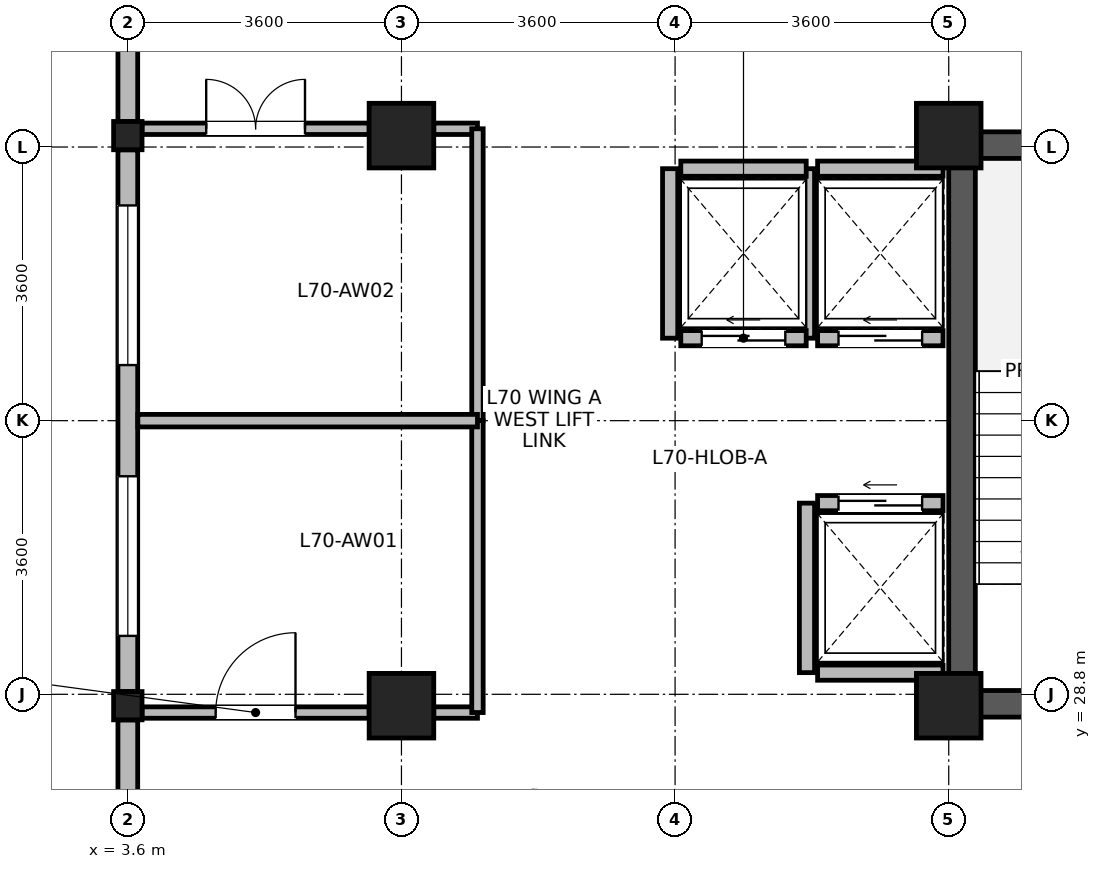
"""IFC4 building model, lengths in metres.
Left out: names, types, materials, properties, quantities, classifications, styles, units other than length and angle.
Written with IfcOpenShell. Run it as: python <this file> out.ifc"""

import sys

from ifc_helpers import new_model, si_unit, direction, frame, frame_2d, origin, origin_2d, place, context, subcontext, project, spatial, rectangle, i_section, extrude, source, transform, mapped, element, fill, save


model = new_model("IFC4")
c1 = context("Model", 3, precision=1e-05, world=origin(), true_north=direction((0.0, 1.0)))
c2 = subcontext(c1, "Body", "Model", "MODEL_VIEW")
j1 = project(units=[si_unit("LENGTHUNIT", "METRE"), si_unit("PLANEANGLEUNIT", "RADIAN")], contexts=[c1])
p1 = place(None, origin())
s1 = spatial("IfcSite", under=j1, at=p1, CompositionType="ELEMENT")
p2 = place(p1, origin())
s2 = spatial("IfcBuilding", under=s1, at=p2, CompositionType="ELEMENT")
p3 = place(p2, frame((0.0, 0.0, 272.1)))
s3 = spatial("IfcBuildingStorey", under=s2, at=p3, CompositionType="ELEMENT", Elevation=272.1)
p4 = place(p3, frame((14.575, 28.5, 0.0), z_axis=(0.0, 0.0, 1.0), x_axis=(0.0, 1.0, 0.0)))
e1 = element("IfcWall", 1, at=p4, inside=s3, PredefinedType="SHEAR", context=c2, shape_type="SweptSolid", body=[
    extrude(rectangle(XDim=7.7, YDim=0.35, at=frame_2d((3.85, 0.0))), origin(), (0.0, 0.0, 1.0), 3.475),
])
for number, where, z_axis, x_axis in (
    (2, (14.75, 28.675, 0.0), (0.0, 0.0, 1.0), (1.0, 0.0, 0.0)),
    (3, (14.75, 36.025, 0.0), (0.0, 0.0, 1.0), (1.0, 0.0, 0.0)),
):
    element("IfcWall", number, at=place(p3, frame(where, z_axis=z_axis, x_axis=x_axis)), inside=s3, PredefinedType="SHEAR", context=c2, shape_type="SweptSolid", body=[
        extrude(rectangle(XDim=3.2, YDim=0.35, at=frame_2d((1.6, 0.0))), origin(), (0.0, 0.0, 1.0), 3.475),
    ])
m1 = source(origin(), c2, "Body", "SweptSolid", [
    extrude(rectangle(XDim=0.85, YDim=0.85, at=origin_2d()), origin(), (0.0, 0.0, 1.0), 3.7),
])
for number, where, z_axis, x_axis in (
    (4, (7.2, 28.65, 0.0), (0.0, 0.0, 1.0), (1.0, 0.0, 0.0)),
    (5, (7.2, 36.15, 0.0), (0.0, 0.0, 1.0), (1.0, 0.0, 0.0)),
    (6, (14.4, 28.65, 0.0), (0.0, 0.0, 1.0), (1.0, 0.0, 0.0)),
    (7, (14.4, 36.15, 0.0), (0.0, 0.0, 1.0), (1.0, 0.0, 0.0)),
):
    element("IfcColumn", number, at=place(p3, frame(where, z_axis=z_axis, x_axis=x_axis)), inside=s3, PredefinedType="COLUMN", context=c2, shape_type="MappedRepresentation", body=[
        mapped(m1, transform((0.0, 0.0, 0.0), x_axis=(1.0, 0.0, 0.0), y_axis=(0.0, 1.0, 0.0), z_axis=(0.0, 0.0, 1.0), scale=1.0)),
    ])
m2 = source(origin(), c2, "Body", "SweptSolid", [
    extrude(i_section(OverallWidth=0.374, OverallDepth=0.372, WebThickness=0.015, FlangeThickness=0.026, FilletRadius=0.015, at=origin_2d()), origin(), (0.0, 0.0, 1.0), 3.7),
])
for number, where, z_axis, x_axis in (
    (8, (3.6, 28.65, 0.0), (0.0, 0.0, 1.0), (1.0, 0.0, 0.0)),
    (9, (3.6, 36.15, 0.0), (0.0, 0.0, 1.0), (1.0, 0.0, 0.0)),
):
    element("IfcColumn", number, at=place(p3, frame(where, z_axis=z_axis, x_axis=x_axis)), inside=s3, PredefinedType="COLUMN", context=c2, shape_type="MappedRepresentation", body=[
        mapped(m2, transform((0.0, 0.0, 0.0), x_axis=(1.0, 0.0, 0.0), y_axis=(0.0, 1.0, 0.0), z_axis=(0.0, 0.0, 1.0), scale=1.0)),
    ])
p5 = place(p3, frame((3.6, 36.337, 0.0), z_axis=(0.0, 0.0, 1.0), x_axis=(0.0, 1.0, 0.0)))
e10 = element("IfcWall", 10, at=p5, inside=s3, PredefinedType="STANDARD", context=c2, shape_type="SweptSolid", body=[
    extrude(rectangle(XDim=6.993, YDim=0.26, at=frame_2d((3.497, 0.0))), origin(), (0.0, 0.0, 1.0), 3.455),
])
p6 = place(p5, frame((4.195, 0.0, 0.85)))
e11 = element("IfcOpeningElement", 11, at=p6, cuts=e10, PredefinedType="OPENING", context=c2, shape_type="SweptSolid", body=[
    extrude(rectangle(XDim=2.1, YDim=1.95, at=frame_2d((1.05, 0.975))), frame((0.0, 0.14, 0.0), z_axis=(0.0, -1.0, 0.0), x_axis=(1.0, 0.0, 0.0)), (0.0, 0.0, 1.0), 0.28),
])
p7 = place(p5, frame((2.462, 0.0, 0.85)))
e12 = element("IfcOpeningElement", 12, at=p7, cuts=e10, PredefinedType="OPENING", context=c2, shape_type="SweptSolid", body=[
    extrude(rectangle(XDim=0.95, YDim=1.75, at=frame_2d((0.475, 0.875))), frame((0.0, 0.14, 0.0), z_axis=(0.0, -1.0, 0.0), x_axis=(1.0, 0.0, 0.0)), (0.0, 0.0, 1.0), 0.28),
])
p8 = place(p3, frame((3.6, 28.837, 0.0), z_axis=(0.0, 0.0, 1.0), x_axis=(0.0, 1.0, 0.0)))
e13 = element("IfcWall", 13, at=p8, inside=s3, PredefinedType="STANDARD", context=c2, shape_type="SweptSolid", body=[
    extrude(rectangle(XDim=7.126, YDim=0.26, at=frame_2d((3.563, 0.0))), origin(), (0.0, 0.0, 1.0), 3.055),
])
p9 = place(p8, frame((0.731, 0.0, 0.85)))
e14 = element("IfcOpeningElement", 14, at=p9, cuts=e13, PredefinedType="OPENING", context=c2, shape_type="SweptSolid", body=[
    extrude(rectangle(XDim=2.1, YDim=1.95, at=frame_2d((1.05, 0.975))), frame((0.0, 0.14, 0.0), z_axis=(0.0, -1.0, 0.0), x_axis=(1.0, 0.0, 0.0)), (0.0, 0.0, 1.0), 0.28),
])
p10 = place(p8, frame((4.294, 0.0, 0.85)))
e15 = element("IfcOpeningElement", 15, at=p10, cuts=e13, PredefinedType="OPENING", context=c2, shape_type="SweptSolid", body=[
    extrude(rectangle(XDim=2.1, YDim=1.95, at=frame_2d((1.05, 0.975))), frame((0.0, 0.14, 0.0), z_axis=(0.0, -1.0, 0.0), x_axis=(1.0, 0.0, 0.0)), (0.0, 0.0, 1.0), 0.28),
])
p11 = place(p3, frame((3.6, 21.47, 0.0), z_axis=(0.0, 0.0, 1.0), x_axis=(0.0, 1.0, 0.0)))
e16 = element("IfcWall", 16, at=p11, inside=s3, PredefinedType="STANDARD", context=c2, shape_type="SweptSolid", body=[
    extrude(rectangle(XDim=6.993, YDim=0.26, at=frame_2d((3.497, 0.0))), origin(), (0.0, 0.0, 1.0), 3.455),
])
p12 = place(p11, frame((3.021, 0.0, 0.85)))
e17 = element("IfcOpeningElement", 17, at=p12, cuts=e16, PredefinedType="OPENING", context=c2, shape_type="SweptSolid", body=[
    extrude(rectangle(XDim=0.95, YDim=1.75, at=frame_2d((0.475, 0.875))), frame((0.0, 0.14, 0.0), z_axis=(0.0, -1.0, 0.0), x_axis=(1.0, 0.0, 0.0)), (0.0, 0.0, 1.0), 0.28),
])
p13 = place(p3, frame((12.675, 33.485, 0.0), z_axis=(0.0, 0.0, 1.0), x_axis=(1.0, 0.0, 0.0)))
e18 = element("IfcWall", 18, at=p13, inside=s3, PredefinedType="PARTITIONING", context=c2, shape_type="SweptSolid", body=[
    extrude(rectangle(XDim=1.65, YDim=0.2, at=frame_2d((0.825, 0.0))), origin(), (0.0, 0.0, 1.0), 3.455),
])
p14 = place(p13, frame((0.275, 0.0, 0.0)))
e19 = element("IfcOpeningElement", 19, at=p14, cuts=e18, PredefinedType="OPENING", context=c2, shape_type="SweptSolid", body=[
    extrude(rectangle(XDim=1.1, YDim=2.12, at=frame_2d((0.55, 1.06))), frame((0.0, 0.11, 0.0), z_axis=(0.0, -1.0, 0.0), x_axis=(1.0, 0.0, 0.0)), (0.0, 0.0, 1.0), 0.22),
])
p15 = place(p3, frame((12.675, 35.715, 0.0), z_axis=(0.0, 0.0, 1.0), x_axis=(1.0, 0.0, 0.0)))
e20 = element("IfcWall", 20, at=p15, inside=s3, PredefinedType="PARTITIONING", context=c2, shape_type="SweptSolid", body=[
    extrude(rectangle(XDim=1.65, YDim=0.2, at=frame_2d((0.825, 0.0))), origin(), (0.0, 0.0, 1.0), 3.455),
])
p16 = place(p3, frame((12.535, 33.485, 0.0), z_axis=(0.0, 0.0, 1.0), x_axis=(0.0, 1.0, 0.0)))
e21 = element("IfcWall", 21, at=p16, inside=s3, PredefinedType="PARTITIONING", context=c2, shape_type="SweptSolid", body=[
    extrude(rectangle(XDim=2.23, YDim=0.2, at=frame_2d((1.115, 0.0))), origin(), (0.0, 0.0, 1.0), 3.455),
])
p17 = place(p3, frame((12.675, 29.085, 0.0), z_axis=(0.0, 0.0, 1.0), x_axis=(1.0, 0.0, 0.0)))
e22 = element("IfcWall", 22, at=p17, inside=s3, PredefinedType="PARTITIONING", context=c2, shape_type="SweptSolid", body=[
    extrude(rectangle(XDim=1.65, YDim=0.2, at=frame_2d((0.825, 0.0))), origin(), (0.0, 0.0, 1.0), 3.455),
])
p18 = place(p3, frame((12.675, 31.315, 0.0), z_axis=(0.0, 0.0, 1.0), x_axis=(1.0, 0.0, 0.0)))
e23 = element("IfcWall", 23, at=p18, inside=s3, PredefinedType="PARTITIONING", context=c2, shape_type="SweptSolid", body=[
    extrude(rectangle(XDim=1.65, YDim=0.2, at=frame_2d((0.825, 0.0))), origin(), (0.0, 0.0, 1.0), 3.455),
])
p19 = place(p18, frame((0.275, 0.0, 0.0)))
e24 = element("IfcOpeningElement", 24, at=p19, cuts=e23, PredefinedType="OPENING", context=c2, shape_type="SweptSolid", body=[
    extrude(rectangle(XDim=1.1, YDim=2.12, at=frame_2d((0.55, 1.06))), frame((0.0, 0.11, 0.0), z_axis=(0.0, -1.0, 0.0), x_axis=(1.0, 0.0, 0.0)), (0.0, 0.0, 1.0), 0.22),
])
p20 = place(p3, frame((12.535, 29.085, 0.0), z_axis=(0.0, 0.0, 1.0), x_axis=(0.0, 1.0, 0.0)))
e25 = element("IfcWall", 25, at=p20, inside=s3, PredefinedType="PARTITIONING", context=c2, shape_type="SweptSolid", body=[
    extrude(rectangle(XDim=2.23, YDim=0.2, at=frame_2d((1.115, 0.0))), origin(), (0.0, 0.0, 1.0), 3.455),
])
p21 = place(p3, frame((10.875, 33.485, 0.0), z_axis=(0.0, 0.0, 1.0), x_axis=(1.0, 0.0, 0.0)))
e26 = element("IfcWall", 26, at=p21, inside=s3, PredefinedType="PARTITIONING", context=c2, shape_type="SweptSolid", body=[
    extrude(rectangle(XDim=1.65, YDim=0.2, at=frame_2d((0.825, 0.0))), origin(), (0.0, 0.0, 1.0), 3.455),
])
p22 = place(p21, frame((0.275, 0.0, 0.0)))
e27 = element("IfcOpeningElement", 27, at=p22, cuts=e26, PredefinedType="OPENING", context=c2, shape_type="SweptSolid", body=[
    extrude(rectangle(XDim=1.1, YDim=2.12, at=frame_2d((0.55, 1.06))), frame((0.0, 0.11, 0.0), z_axis=(0.0, -1.0, 0.0), x_axis=(1.0, 0.0, 0.0)), (0.0, 0.0, 1.0), 0.22),
])
p23 = place(p3, frame((10.875, 35.715, 0.0), z_axis=(0.0, 0.0, 1.0), x_axis=(1.0, 0.0, 0.0)))
e28 = element("IfcWall", 28, at=p23, inside=s3, PredefinedType="PARTITIONING", context=c2, shape_type="SweptSolid", body=[
    extrude(rectangle(XDim=1.65, YDim=0.2, at=frame_2d((0.825, 0.0))), origin(), (0.0, 0.0, 1.0), 3.455),
])
p24 = place(p3, frame((10.735, 33.485, 0.0), z_axis=(0.0, 0.0, 1.0), x_axis=(0.0, 1.0, 0.0)))
e29 = element("IfcWall", 29, at=p24, inside=s3, PredefinedType="PARTITIONING", context=c2, shape_type="SweptSolid", body=[
    extrude(rectangle(XDim=2.23, YDim=0.2, at=frame_2d((1.115, 0.0))), origin(), (0.0, 0.0, 1.0), 3.455),
])
p25 = place(p3, frame((3.787, 28.56, 0.0), z_axis=(0.0, 0.0, 1.0), x_axis=(1.0, 0.0, 0.0)))
e30 = element("IfcWall", 30, at=p25, inside=s3, PredefinedType="PARTITIONING", context=c2, shape_type="SweptSolid", body=[
    extrude(rectangle(XDim=2.988, YDim=0.15, at=frame_2d((1.494, 0.0))), origin(), (0.0, 0.0, 1.0), 2.905),
])
p26 = place(p25, frame((0.969, 0.0, 0.0)))
e31 = element("IfcOpeningElement", 31, at=p26, cuts=e30, PredefinedType="OPENING", context=c2, shape_type="SweptSolid", body=[
    extrude(rectangle(XDim=1.05, YDim=2.12, at=frame_2d((0.525, 1.06))), frame((0.0, 0.085, 0.0), z_axis=(0.0, -1.0, 0.0), x_axis=(1.0, 0.0, 0.0)), (0.0, 0.0, 1.0), 0.17),
])
p27 = place(p3, frame((7.625, 28.56, 0.0), z_axis=(0.0, 0.0, 1.0), x_axis=(1.0, 0.0, 0.0)))
e32 = element("IfcWall", 32, at=p27, inside=s3, PredefinedType="PARTITIONING", context=c2, shape_type="SweptSolid", body=[
    extrude(rectangle(XDim=0.575, YDim=0.15, at=frame_2d((0.288, 0.0))), origin(), (0.0, 0.0, 1.0), 2.905),
])
p28 = place(p3, frame((3.787, 36.24, 0.0), z_axis=(0.0, 0.0, 1.0), x_axis=(1.0, 0.0, 0.0)))
e33 = element("IfcWall", 33, at=p28, inside=s3, PredefinedType="PARTITIONING", context=c2, shape_type="SweptSolid", body=[
    extrude(rectangle(XDim=2.988, YDim=0.15, at=frame_2d((1.494, 0.0))), origin(), (0.0, 0.0, 1.0), 2.905),
])
p29 = place(p28, frame((0.844, 0.0, 0.0)))
e34 = element("IfcOpeningElement", 34, at=p29, cuts=e33, PredefinedType="OPENING", context=c2, shape_type="SweptSolid", body=[
    extrude(rectangle(XDim=1.3, YDim=2.12, at=frame_2d((0.65, 1.06))), frame((0.0, 0.085, 0.0), z_axis=(0.0, -1.0, 0.0), x_axis=(1.0, 0.0, 0.0)), (0.0, 0.0, 1.0), 0.17),
])
p30 = place(p3, frame((7.625, 36.24, 0.0), z_axis=(0.0, 0.0, 1.0), x_axis=(1.0, 0.0, 0.0)))
e35 = element("IfcWall", 35, at=p30, inside=s3, PredefinedType="PARTITIONING", context=c2, shape_type="SweptSolid", body=[
    extrude(rectangle(XDim=0.575, YDim=0.15, at=frame_2d((0.288, 0.0))), origin(), (0.0, 0.0, 1.0), 2.905),
])
p31 = place(p3, frame((8.2, 32.4, 0.0), z_axis=(0.0, 0.0, 1.0), x_axis=(0.0, 1.0, 0.0)))
e36 = element("IfcWall", 36, at=p31, inside=s3, PredefinedType="PARTITIONING", context=c2, shape_type="SweptSolid", body=[
    extrude(rectangle(XDim=3.84, YDim=0.15, at=frame_2d((1.92, 0.0))), origin(), (0.0, 0.0, 1.0), 3.455),
])
p32 = place(p3, frame((8.2, 28.56, 0.0), z_axis=(0.0, 0.0, 1.0), x_axis=(0.0, 1.0, 0.0)))
e37 = element("IfcWall", 37, at=p32, inside=s3, PredefinedType="PARTITIONING", context=c2, shape_type="SweptSolid", body=[
    extrude(rectangle(XDim=3.84, YDim=0.15, at=frame_2d((1.92, 0.0))), origin(), (0.0, 0.0, 1.0), 3.455),
])
p33 = place(p3, frame((3.732, 32.4, 0.0), z_axis=(0.0, 0.0, 1.0), x_axis=(1.0, 0.0, 0.0)))
e38 = element("IfcWall", 38, at=p33, inside=s3, PredefinedType="PARTITIONING", context=c2, shape_type="SweptSolid", body=[
    extrude(rectangle(XDim=4.468, YDim=0.165, at=frame_2d((2.234, 0.0))), origin(), (0.0, 0.0, 1.0), 3.455),
])
p34 = place(p9, origin())
e39 = element("IfcWindow", 39, at=p34, inside=s3, PartitioningType="SINGLE_PANEL", PredefinedType="WINDOW", context=c2, shape_type="SweptSolid", body=[
    extrude(rectangle(XDim=2.1, YDim=1.95, at=frame_2d((1.05, 0.975))), frame((0.0, 0.03, 0.0), z_axis=(0.0, -1.0, 0.0), x_axis=(1.0, 0.0, 0.0)), (0.0, 0.0, 1.0), 0.06),
])
fill(e14, e39)
p35 = place(p10, origin())
e40 = element("IfcWindow", 40, at=p35, inside=s3, PartitioningType="SINGLE_PANEL", PredefinedType="WINDOW", context=c2, shape_type="SweptSolid", body=[
    extrude(rectangle(XDim=2.1, YDim=1.95, at=frame_2d((1.05, 0.975))), frame((0.0, 0.03, 0.0), z_axis=(0.0, -1.0, 0.0), x_axis=(1.0, 0.0, 0.0)), (0.0, 0.0, 1.0), 0.06),
])
fill(e15, e40)
p36 = place(p14, origin())
e41 = element("IfcDoor", 41, at=p36, inside=s3, OperationType="SLIDING_TO_LEFT", PredefinedType="DOOR", context=c2, shape_type="SweptSolid", body=[
    extrude(rectangle(XDim=1.1, YDim=2.12, at=frame_2d((0.55, 1.06))), frame((0.0, 0.025, 0.0), z_axis=(0.0, -1.0, 0.0), x_axis=(1.0, 0.0, 0.0)), (0.0, 0.0, 1.0), 0.05),
])
fill(e19, e41)
p37 = place(p19, origin())
e42 = element("IfcDoor", 42, at=p37, inside=s3, OperationType="SLIDING_TO_LEFT", PredefinedType="DOOR", context=c2, shape_type="SweptSolid", body=[
    extrude(rectangle(XDim=1.1, YDim=2.12, at=frame_2d((0.55, 1.06))), frame((0.0, 0.025, 0.0), z_axis=(0.0, -1.0, 0.0), x_axis=(1.0, 0.0, 0.0)), (0.0, 0.0, 1.0), 0.05),
])
fill(e24, e42)
p38 = place(p22, origin())
e43 = element("IfcDoor", 43, at=p38, inside=s3, OperationType="SLIDING_TO_LEFT", PredefinedType="DOOR", context=c2, shape_type="SweptSolid", body=[
    extrude(rectangle(XDim=1.1, YDim=2.12, at=frame_2d((0.55, 1.06))), frame((0.0, 0.025, 0.0), z_axis=(0.0, -1.0, 0.0), x_axis=(1.0, 0.0, 0.0)), (0.0, 0.0, 1.0), 0.05),
])
fill(e27, e43)
p39 = place(p26, origin())
e44 = element("IfcDoor", 44, at=p39, inside=s3, OperationType="SINGLE_SWING_RIGHT", PredefinedType="DOOR", context=c2, shape_type="SweptSolid", body=[
    extrude(rectangle(XDim=1.05, YDim=2.12, at=frame_2d((0.525, 1.06))), frame((0.0, 0.025, 0.0), z_axis=(0.0, -1.0, 0.0), x_axis=(1.0, 0.0, 0.0)), (0.0, 0.0, 1.0), 0.05),
])
fill(e31, e44)
p40 = place(p29, origin())
e45 = element("IfcDoor", 45, at=p40, inside=s3, OperationType="DOUBLE_DOOR_SINGLE_SWING", PredefinedType="DOOR", context=c2, shape_type="SweptSolid", body=[
    extrude(rectangle(XDim=1.3, YDim=2.12, at=frame_2d((0.65, 1.06))), frame((0.0, 0.025, 0.0), z_axis=(0.0, -1.0, 0.0), x_axis=(1.0, 0.0, 0.0)), (0.0, 0.0, 1.0), 0.05),
])
fill(e34, e45)
save(model, sys.argv[1])
